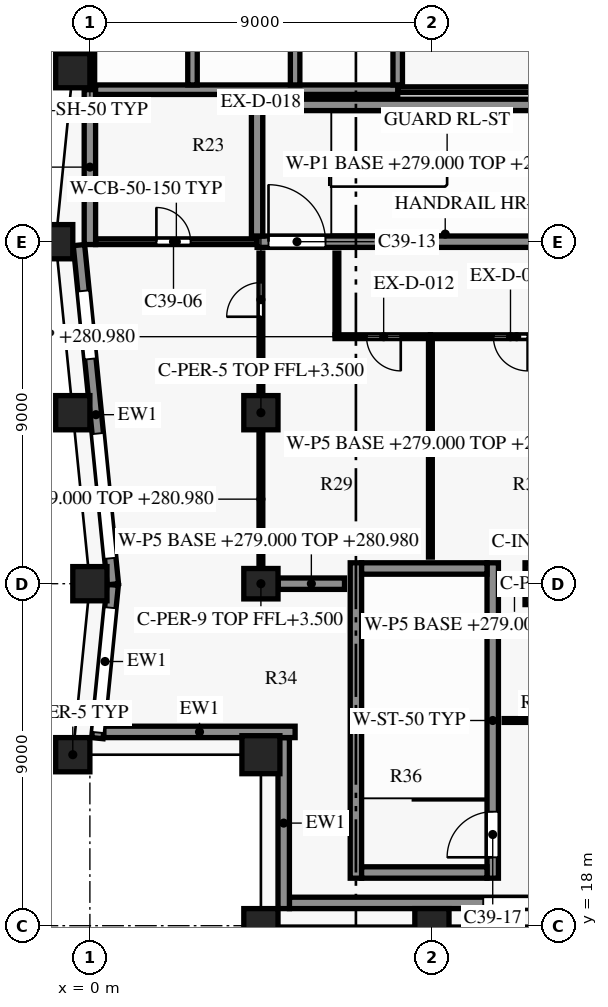
"""IFC4 building model, lengths in metres.
Left out: names, types, materials, properties, quantities, classifications, styles, units other than length and angle.
Written with IfcOpenShell. Run it as: python <this file> out.ifc"""

import sys

from ifc_helpers import new_model, si_unit, direction, frame, frame_2d, origin, origin_2d, place, context, subcontext, project, spatial, rectangle, extrude, element, fill, save


model = new_model("IFC4")
c1 = context("Model", 3, precision=1e-05, world=origin(), true_north=direction((0.0, 1.0)))
c2 = subcontext(c1, "Body", "Model", "MODEL_VIEW")
j1 = project(units=[si_unit("LENGTHUNIT", "METRE"), si_unit("PLANEANGLEUNIT", "RADIAN")], contexts=[c1])
p1 = place(None, origin())
s1 = spatial("IfcSite", under=j1, at=p1, CompositionType="ELEMENT")
p2 = place(p1, origin())
s2 = spatial("IfcBuilding", under=s1, at=p2, CompositionType="ELEMENT")
p3 = place(p2, frame((0.0, 0.0, 279.0)))
s3 = spatial("IfcBuildingStorey", under=s2, at=p3, CompositionType="ELEMENT", Elevation=279.0)
for number, where, z_axis, x_axis in (
    (1, (4.5, 18.0, 0.0), (0.0, 0.0, 1.0), (1.0, 0.0, 0.0)),
    (2, (9.0, 18.0, 0.0), (0.0, 0.0, 1.0), (1.0, 0.0, 0.0)),
    (3, (-0.45, 40.5, 0.0), (0.0, 0.0, 1.0), (-0.1, -0.995, 0.0)),
    (4, (-0.9, 36.0, 0.0), (0.0, 0.0, 1.0), (0.0, -1.0, 0.0)),
    (5, (-0.45, 31.5, 0.0), (0.0, 0.0, 1.0), (0.1, -0.995, 0.0)),
    (6, (0.0, 27.0, 0.0), (0.0, 0.0, 1.0), (0.0, -1.0, 0.0)),
    (7, (-0.45, 22.5, 0.0), (0.0, 0.0, 1.0), (-0.1, -0.995, 0.0)),
):
    element("IfcColumn", number, at=place(p3, frame(where, z_axis=z_axis, x_axis=x_axis)), inside=s3, PredefinedType="COLUMN", context=c2, shape_type="SweptSolid", body=[
        extrude(rectangle(XDim=0.9, YDim=0.9, at=origin_2d()), origin(), (0.0, 0.0, 1.0), 3.8),
    ])
p4 = place(p3, frame((4.5, 22.5, 0.0), z_axis=(0.0, 0.0, 1.0), x_axis=(1.0, 0.0, 0.0)))
e8 = element("IfcColumn", 8, at=p4, inside=s3, PredefinedType="COLUMN", context=c2, shape_type="SweptSolid", body=[
    extrude(rectangle(XDim=1.0, YDim=1.0, at=origin_2d()), origin(), (0.0, 0.0, 1.0), 3.8),
])
p5 = place(p3, frame((12.0, 27.0, 0.0), z_axis=(0.0, 0.0, 1.0), x_axis=(1.0, 0.0, 0.0)))
e9 = element("IfcColumn", 9, at=p5, inside=s3, PredefinedType="COLUMN", context=c2, shape_type="SweptSolid", body=[
    extrude(rectangle(XDim=1.1, YDim=1.1, at=origin_2d()), origin(), (0.0, 0.0, 1.0), 3.8),
])
p6 = place(p3, frame((31.05, 18.6, 0.0), z_axis=(0.0, 0.0, 1.0), x_axis=(-1.0, 0.0, 0.0)))
e10 = element("IfcWall", 10, at=p6, inside=s3, PredefinedType="SOLIDWALL", context=c2, shape_type="SweptSolid", body=[
    extrude(rectangle(XDim=25.8, YDim=0.3, at=frame_2d((12.9, 0.0))), origin(), (0.0, 0.0, 1.0), 3.15),
])
p7 = place(p6, frame((0.9, 0.0, 0.75)))
e11 = element("IfcOpeningElement", 11, at=p7, cuts=e10, PredefinedType="OPENING", context=c2, shape_type="SweptSolid", body=[
    extrude(rectangle(XDim=1.8, YDim=1.8, at=frame_2d((0.9, 0.9))), frame((0.0, 0.16, 0.0), z_axis=(0.0, -1.0, 0.0), x_axis=(1.0, 0.0, 0.0)), (0.0, 0.0, 1.0), 0.32),
])
p8 = place(p6, frame((5.4, 0.0, 0.75)))
e12 = element("IfcOpeningElement", 12, at=p8, cuts=e10, PredefinedType="OPENING", context=c2, shape_type="SweptSolid", body=[
    extrude(rectangle(XDim=1.8, YDim=1.8, at=frame_2d((0.9, 0.9))), frame((0.0, 0.16, 0.0), z_axis=(0.0, -1.0, 0.0), x_axis=(1.0, 0.0, 0.0)), (0.0, 0.0, 1.0), 0.32),
])
p9 = place(p6, frame((9.15, 0.0, 0.15)))
e13 = element("IfcOpeningElement", 13, at=p9, cuts=e10, PredefinedType="OPENING", context=c2, shape_type="SweptSolid", body=[
    extrude(rectangle(XDim=3.3, YDim=2.4, at=frame_2d((1.65, 1.2))), frame((0.0, 0.16, 0.0), z_axis=(0.0, -1.0, 0.0), x_axis=(1.0, 0.0, 0.0)), (0.0, 0.0, 1.0), 0.32),
])
p10 = place(p6, frame((13.65, 0.0, 0.15)))
e14 = element("IfcOpeningElement", 14, at=p10, cuts=e10, PredefinedType="OPENING", context=c2, shape_type="SweptSolid", body=[
    extrude(rectangle(XDim=3.3, YDim=2.4, at=frame_2d((1.65, 1.2))), frame((0.0, 0.16, 0.0), z_axis=(0.0, -1.0, 0.0), x_axis=(1.0, 0.0, 0.0)), (0.0, 0.0, 1.0), 0.32),
])
p11 = place(p6, frame((18.9, 0.0, 0.75)))
e15 = element("IfcOpeningElement", 15, at=p11, cuts=e10, PredefinedType="OPENING", context=c2, shape_type="SweptSolid", body=[
    extrude(rectangle(XDim=1.8, YDim=1.8, at=frame_2d((0.9, 0.9))), frame((0.0, 0.16, 0.0), z_axis=(0.0, -1.0, 0.0), x_axis=(1.0, 0.0, 0.0)), (0.0, 0.0, 1.0), 0.32),
])
p12 = place(p3, frame((0.604, 26.985, 0.0), z_axis=(0.0, 0.0, 1.0), x_axis=(-0.099509108728, 0.995036651225, 0.0)))
e16 = element("IfcWall", 16, at=p12, inside=s3, PredefinedType="SOLIDWALL", context=c2, shape_type="SweptSolid", body=[
    extrude(rectangle(XDim=8.97, YDim=0.3, at=frame_2d((4.485, 0.0))), origin(), (0.0, 0.0, 1.0), 3.15),
])
p13 = place(p12, frame((0.686, 0.0, 0.15)))
e17 = element("IfcOpeningElement", 17, at=p13, cuts=e16, PredefinedType="OPENING", context=c2, shape_type="SweptSolid", body=[
    extrude(rectangle(XDim=3.3, YDim=2.4, at=frame_2d((1.65, 1.2))), frame((0.0, 0.16, 0.0), z_axis=(0.0, -1.0, 0.0), x_axis=(1.0, 0.0, 0.0)), (0.0, 0.0, 1.0), 0.32),
])
p14 = place(p12, frame((5.958, 0.0, 0.75)))
e18 = element("IfcOpeningElement", 18, at=p14, cuts=e16, PredefinedType="OPENING", context=c2, shape_type="SweptSolid", body=[
    extrude(rectangle(XDim=1.8, YDim=1.8, at=frame_2d((0.9, 0.9))), frame((0.0, 0.16, 0.0), z_axis=(0.0, -1.0, 0.0), x_axis=(1.0, 0.0, 0.0)), (0.0, 0.0, 1.0), 0.32),
])
p15 = place(p3, frame((0.197, 22.935, 0.0), z_axis=(0.0, 0.0, 1.0), x_axis=(0.09951564041, 0.995035997999, 0.0)))
e19 = element("IfcWall", 19, at=p15, inside=s3, PredefinedType="SOLIDWALL", context=c2, shape_type="SweptSolid", body=[
    extrude(rectangle(XDim=4.055, YDim=0.3, at=frame_2d((2.028, 0.0))), origin(), (0.0, 0.0, 1.0), 3.15),
])
p16 = place(p15, frame((0.15, 0.0, 0.15)))
e20 = element("IfcOpeningElement", 20, at=p16, cuts=e19, PredefinedType="OPENING", context=c2, shape_type="SweptSolid", body=[
    extrude(rectangle(XDim=3.3, YDim=2.4, at=frame_2d((1.65, 1.2))), frame((0.0, 0.16, 0.0), z_axis=(0.0, -1.0, 0.0), x_axis=(1.0, 0.0, 0.0)), (0.0, 0.0, 1.0), 0.32),
])
p17 = place(p3, frame((5.4, 23.1, 0.0), z_axis=(0.0, 0.0, 1.0), x_axis=(-1.0, 0.0, 0.0)))
e21 = element("IfcWall", 21, at=p17, inside=s3, PredefinedType="SOLIDWALL", context=c2, shape_type="SweptSolid", body=[
    extrude(rectangle(XDim=5.031, YDim=0.3, at=frame_2d((2.516, 0.0))), origin(), (0.0, 0.0, 1.0), 3.15),
])
p18 = place(p3, frame((5.1, 18.45, 0.0), z_axis=(0.0, 0.0, 1.0), x_axis=(0.0, 1.0, 0.0)))
e22 = element("IfcWall", 22, at=p18, inside=s3, PredefinedType="SOLIDWALL", context=c2, shape_type="SweptSolid", body=[
    extrude(rectangle(XDim=4.5, YDim=0.3, at=frame_2d((2.25, 0.0))), origin(), (0.0, 0.0, 1.0), 3.15),
])
for number, where, z_axis, x_axis in (
    (23, (7.15, 19.4, 0.0), (0.0, 0.0, 1.0), (1.0, 0.0, 0.0)),
    (24, (7.15, 27.4, 0.0), (0.0, 0.0, 1.0), (1.0, 0.0, 0.0)),
):
    element("IfcWall", number, at=place(p3, frame(where, z_axis=z_axis, x_axis=x_axis)), inside=s3, PredefinedType="SHEAR", context=c2, shape_type="SweptSolid", body=[
        extrude(rectangle(XDim=3.3, YDim=0.3, at=frame_2d((1.65, 0.0))), origin(), (0.0, 0.0, 1.0), 3.5),
    ])
p19 = place(p3, frame((0.15, 36.0, 0.0), z_axis=(0.0, 0.0, 1.0), x_axis=(1.0, 0.0, 0.0)))
e25 = element("IfcWall", 25, at=p19, inside=s3, PredefinedType="SHEAR", context=c2, shape_type="SweptSolid", body=[
    extrude(rectangle(XDim=4.25, YDim=0.15, at=frame_2d((2.125, 0.0))), origin(), (0.0, 0.0, 1.0), 3.5),
])
p20 = place(p19, frame((1.6, 0.0, 0.0)))
e26 = element("IfcOpeningElement", 26, at=p20, cuts=e25, PredefinedType="OPENING", context=c2, shape_type="SweptSolid", body=[
    extrude(rectangle(XDim=0.9, YDim=2.1, at=frame_2d((0.45, 1.05))), frame((0.0, 0.085, 0.0), z_axis=(0.0, -1.0, 0.0), x_axis=(1.0, 0.0, 0.0)), (0.0, 0.0, 1.0), 0.17),
])
p21 = place(p3, frame((4.4, 36.0, 0.0), z_axis=(0.0, 0.0, 1.0), x_axis=(1.0, 0.0, 0.0)))
e27 = element("IfcWall", 27, at=p21, inside=s3, PredefinedType="SHEAR", context=c2, shape_type="SweptSolid", body=[
    extrude(rectangle(XDim=8.0, YDim=0.3, at=frame_2d((4.0, 0.0))), origin(), (0.0, 0.0, 1.0), 3.5),
])
p22 = place(p21, frame((0.3, 0.0, 0.0)))
e28 = element("IfcOpeningElement", 28, at=p22, cuts=e27, PredefinedType="OPENING", context=c2, shape_type="SweptSolid", body=[
    extrude(rectangle(XDim=1.5, YDim=2.2, at=frame_2d((0.75, 1.1))), frame((0.0, 0.16, 0.0), z_axis=(0.0, -1.0, 0.0), x_axis=(1.0, 0.0, 0.0)), (0.0, 0.0, 1.0), 0.32),
])
p23 = place(p3, frame((4.55, 39.6, 0.0), z_axis=(0.0, 0.0, 1.0), x_axis=(1.0, 0.0, 0.0)))
e29 = element("IfcWall", 29, at=p23, inside=s3, PredefinedType="SHEAR", context=c2, shape_type="SweptSolid", body=[
    extrude(rectangle(XDim=7.7, YDim=0.3, at=frame_2d((3.85, 0.0))), origin(), (0.0, 0.0, 1.0), 3.5),
])
p24 = place(p3, frame((8.1, 40.0, 0.0), z_axis=(0.0, 0.0, 1.0), x_axis=(1.0, 0.0, 0.0)))
e30 = element("IfcWall", 30, at=p24, inside=s3, PredefinedType="SHEAR", context=c2, shape_type="SweptSolid", body=[
    extrude(rectangle(XDim=16.125, YDim=0.15, at=frame_2d((8.062, 0.0))), origin(), (0.0, 0.0, 1.0), 3.5),
])
p25 = place(p3, frame((0.15, 40.0, 0.0), z_axis=(0.0, 0.0, 1.0), x_axis=(1.0, 0.0, 0.0)))
e31 = element("IfcWall", 31, at=p25, inside=s3, PredefinedType="SHEAR", context=c2, shape_type="SweptSolid", body=[
    extrude(rectangle(XDim=7.95, YDim=0.25, at=frame_2d((3.975, 0.0))), origin(), (0.0, 0.0, 1.0), 3.5),
])
p26 = place(p3, frame((0.0, 35.925, 0.0), z_axis=(0.0, 0.0, 1.0), x_axis=(0.0, 1.0, 0.0)))
e32 = element("IfcWall", 32, at=p26, inside=s3, PredefinedType="SHEAR", context=c2, shape_type="SweptSolid", body=[
    extrude(rectangle(XDim=4.075, YDim=0.3, at=frame_2d((2.038, 0.0))), origin(), (0.0, 0.0, 1.0), 3.5),
])
p27 = place(p3, frame((0.0, 40.0, 0.0), z_axis=(0.0, 0.0, 1.0), x_axis=(0.0, 1.0, 0.0)))
e33 = element("IfcWall", 33, at=p27, inside=s3, PredefinedType="SHEAR", context=c2, shape_type="SweptSolid", body=[
    extrude(rectangle(XDim=3.325, YDim=0.25, at=frame_2d((1.663, 0.0))), origin(), (0.0, 0.0, 1.0), 3.5),
])
p28 = place(p3, frame((2.7, 40.125, 0.0), z_axis=(0.0, 0.0, 1.0), x_axis=(0.0, 1.0, 0.0)))
e34 = element("IfcWall", 34, at=p28, inside=s3, PredefinedType="SHEAR", context=c2, shape_type="SweptSolid", body=[
    extrude(rectangle(XDim=2.95, YDim=0.25, at=frame_2d((1.475, 0.0))), origin(), (0.0, 0.0, 1.0), 3.5),
])
p29 = place(p3, frame((4.4, 39.6, 0.0), z_axis=(0.0, 0.0, 1.0), x_axis=(0.0, 1.0, 0.0)))
e35 = element("IfcWall", 35, at=p29, inside=s3, PredefinedType="SHEAR", context=c2, shape_type="SweptSolid", body=[
    extrude(rectangle(XDim=0.275, YDim=0.15, at=frame_2d((0.137, 0.0))), origin(), (0.0, 0.0, 1.0), 3.5),
])
p30 = place(p3, frame((4.4, 36.15, 0.0), z_axis=(0.0, 0.0, 1.0), x_axis=(0.0, 1.0, 0.0)))
e36 = element("IfcWall", 36, at=p30, inside=s3, PredefinedType="SHEAR", context=c2, shape_type="SweptSolid", body=[
    extrude(rectangle(XDim=3.45, YDim=0.3, at=frame_2d((1.725, 0.0))), origin(), (0.0, 0.0, 1.0), 3.5),
])
p31 = place(p3, frame((5.4, 40.125, 0.0), z_axis=(0.0, 0.0, 1.0), x_axis=(0.0, 1.0, 0.0)))
e37 = element("IfcWall", 37, at=p31, inside=s3, PredefinedType="SHEAR", context=c2, shape_type="SweptSolid", body=[
    extrude(rectangle(XDim=2.95, YDim=0.25, at=frame_2d((1.475, 0.0))), origin(), (0.0, 0.0, 1.0), 3.5),
])
p32 = place(p3, frame((7.0, 19.25, 0.0), z_axis=(0.0, 0.0, 1.0), x_axis=(0.0, 1.0, 0.0)))
e38 = element("IfcWall", 38, at=p32, inside=s3, PredefinedType="SHEAR", context=c2, shape_type="SweptSolid", body=[
    extrude(rectangle(XDim=8.3, YDim=0.3, at=frame_2d((4.15, 0.0))), origin(), (0.0, 0.0, 1.0), 3.5),
])
p33 = place(p3, frame((8.1, 40.125, 0.0), z_axis=(0.0, 0.0, 1.0), x_axis=(0.0, 1.0, 0.0)))
e39 = element("IfcWall", 39, at=p33, inside=s3, PredefinedType="SHEAR", context=c2, shape_type="SweptSolid", body=[
    extrude(rectangle(XDim=2.95, YDim=0.25, at=frame_2d((1.475, 0.0))), origin(), (0.0, 0.0, 1.0), 3.5),
])
p34 = place(p3, frame((10.6, 19.25, 0.0), z_axis=(0.0, 0.0, 1.0), x_axis=(0.0, 1.0, 0.0)))
e40 = element("IfcWall", 40, at=p34, inside=s3, PredefinedType="SHEAR", context=c2, shape_type="SweptSolid", body=[
    extrude(rectangle(XDim=8.3, YDim=0.3, at=frame_2d((4.15, 0.0))), origin(), (0.0, 0.0, 1.0), 3.5),
])
p35 = place(p34, frame((0.55, 0.0, 0.0)))
e41 = element("IfcOpeningElement", 41, at=p35, cuts=e40, PredefinedType="OPENING", context=c2, shape_type="SweptSolid", body=[
    extrude(rectangle(XDim=1.2, YDim=2.2, at=frame_2d((0.6, 1.1))), frame((0.0, 0.16, 0.0), z_axis=(0.0, -1.0, 0.0), x_axis=(1.0, 0.0, 0.0)), (0.0, 0.0, 1.0), 0.32),
])
p36 = place(p3, frame((18.0, 23.4, 0.0), z_axis=(0.0, 0.0, 1.0), x_axis=(-1.0, 0.0, 0.0)))
e42 = element("IfcWall", 42, at=p36, inside=s3, PredefinedType="PARTITIONING", context=c2, shape_type="SweptSolid", body=[
    extrude(rectangle(XDim=7.1, YDim=0.1, at=frame_2d((3.55, 0.0))), origin(), (0.0, 0.0, 1.0), 2.73),
])
p37 = place(p36, frame((2.55, 0.0, 0.0)))
e43 = element("IfcOpeningElement", 43, at=p37, cuts=e42, PredefinedType="OPENING", context=c2, shape_type="SweptSolid", body=[
    extrude(rectangle(XDim=1.8, YDim=2.1, at=frame_2d((0.9, 1.05))), frame((0.0, 0.06, 0.0), z_axis=(0.0, -1.0, 0.0), x_axis=(1.0, 0.0, 0.0)), (0.0, 0.0, 1.0), 0.12),
])
p38 = place(p3, frame((6.7, 27.0, 0.0), z_axis=(0.0, 0.0, 1.0), x_axis=(-1.0, 0.0, 0.0)))
e44 = element("IfcWall", 44, at=p38, inside=s3, PredefinedType="PARTITIONING", context=c2, shape_type="SweptSolid", body=[
    extrude(rectangle(XDim=1.745, YDim=0.3, at=frame_2d((0.873, 0.0))), origin(), (0.0, 0.0, 1.0), 1.98),
])
p39 = place(p3, frame((10.9, 27.0, 0.0), z_axis=(0.0, 0.0, 1.0), x_axis=(1.0, 0.0, 0.0)))
e45 = element("IfcWall", 45, at=p39, inside=s3, PredefinedType="PARTITIONING", context=c2, shape_type="SweptSolid", body=[
    extrude(rectangle(XDim=0.545, YDim=0.3, at=frame_2d((0.272, 0.0))), origin(), (0.0, 0.0, 1.0), 3.33),
])
p40 = place(p3, frame((4.5, 27.405, 0.0), z_axis=(0.0, 0.0, 1.0), x_axis=(0.0, 1.0, 0.0)))
e46 = element("IfcWall", 46, at=p40, inside=s3, PredefinedType="PARTITIONING", context=c2, shape_type="SweptSolid", body=[
    extrude(rectangle(XDim=3.64, YDim=0.1, at=frame_2d((1.82, 0.0))), origin(), (0.0, 0.0, 1.0), 1.98),
])
p41 = place(p3, frame((4.5, 31.955, 0.0), z_axis=(0.0, 0.0, 1.0), x_axis=(0.0, 1.0, 0.0)))
e47 = element("IfcWall", 47, at=p41, inside=s3, PredefinedType="PARTITIONING", context=c2, shape_type="SweptSolid", body=[
    extrude(rectangle(XDim=3.745, YDim=0.1, at=frame_2d((1.873, 0.0))), origin(), (0.0, 0.0, 1.0), 3.33),
])
p42 = place(p41, frame((2.07, 0.0, 0.0)))
e48 = element("IfcOpeningElement", 48, at=p42, cuts=e47, PredefinedType="OPENING", context=c2, shape_type="SweptSolid", body=[
    extrude(rectangle(XDim=0.9, YDim=2.1, at=frame_2d((0.45, 1.05))), frame((0.0, 0.06, 0.0), z_axis=(0.0, -1.0, 0.0), x_axis=(1.0, 0.0, 0.0)), (0.0, 0.0, 1.0), 0.12),
])
p43 = place(p3, frame((8.96, 33.45, 0.0), z_axis=(0.0, 0.0, 1.0), x_axis=(0.0, -1.0, 0.0)))
e49 = element("IfcWall", 49, at=p43, inside=s3, PredefinedType="PARTITIONING", context=c2, shape_type="SweptSolid", body=[
    extrude(rectangle(XDim=5.75, YDim=0.1, at=frame_2d((2.875, 0.0))), origin(), (0.0, 0.0, 1.0), 3.33),
])
p44 = place(p3, frame((8.96, 33.5, 0.0), z_axis=(0.0, 0.0, 1.0), x_axis=(-1.0, 0.0, 0.0)))
e50 = element("IfcWall", 50, at=p44, inside=s3, PredefinedType="PARTITIONING", context=c2, shape_type="SweptSolid", body=[
    extrude(rectangle(XDim=2.51, YDim=0.1, at=frame_2d((1.255, 0.0))), origin(), (0.0, 0.0, 1.0), 3.33),
])
p45 = place(p44, frame((0.78, 0.0, 0.0)))
e51 = element("IfcOpeningElement", 51, at=p45, cuts=e50, PredefinedType="OPENING", context=c2, shape_type="SweptSolid", body=[
    extrude(rectangle(XDim=0.9, YDim=2.1, at=frame_2d((0.45, 1.05))), frame((0.0, 0.06, 0.0), z_axis=(0.0, -1.0, 0.0), x_axis=(1.0, 0.0, 0.0)), (0.0, 0.0, 1.0), 0.12),
])
p46 = place(p3, frame((13.5, 33.5, 0.0), z_axis=(0.0, 0.0, 1.0), x_axis=(-1.0, 0.0, 0.0)))
e52 = element("IfcWall", 52, at=p46, inside=s3, PredefinedType="PARTITIONING", context=c2, shape_type="SweptSolid", body=[
    extrude(rectangle(XDim=4.54, YDim=0.1, at=frame_2d((2.27, 0.0))), origin(), (0.0, 0.0, 1.0), 1.98),
])
p47 = place(p46, frame((1.982, 0.0, 0.0)))
e53 = element("IfcOpeningElement", 53, at=p47, cuts=e52, PredefinedType="OPENING", context=c2, shape_type="SweptSolid", body=[
    extrude(rectangle(XDim=0.9, YDim=2.1, at=frame_2d((0.45, 1.05))), frame((0.0, 0.06, 0.0), z_axis=(0.0, -1.0, 0.0), x_axis=(1.0, 0.0, 0.0)), (0.0, 0.0, 1.0), 0.12),
])
p48 = place(p3, frame((6.5, 33.55, 0.0), z_axis=(0.0, 0.0, 1.0), x_axis=(0.0, 1.0, 0.0)))
e54 = element("IfcWall", 54, at=p48, inside=s3, PredefinedType="PARTITIONING", context=c2, shape_type="SweptSolid", body=[
    extrude(rectangle(XDim=2.15, YDim=0.1, at=frame_2d((1.075, 0.0))), origin(), (0.0, 0.0, 1.0), 3.33),
])
p49 = place(p3, frame((4.5, 27.0, 0.0), z_axis=(0.0, 0.0, 1.0), x_axis=(1.0, 0.0, 0.0)))
e55 = element("IfcColumn", 55, at=p49, inside=s3, PredefinedType="COLUMN", context=c2, shape_type="SweptSolid", body=[
    extrude(rectangle(XDim=0.9, YDim=0.8, at=origin_2d()), origin(), (0.0, 0.0, 1.0), 3.5),
])
p50 = place(p3, frame((4.5, 31.5, 0.0), z_axis=(0.0, 0.0, 1.0), x_axis=(1.0, 0.0, 0.0)))
e56 = element("IfcColumn", 56, at=p50, inside=s3, PredefinedType="COLUMN", context=c2, shape_type="SweptSolid", body=[
    extrude(rectangle(XDim=0.9, YDim=0.9, at=origin_2d()), origin(), (0.0, 0.0, 1.0), 3.5),
])
p51 = place(p11, origin())
e57 = element("IfcWindow", 57, at=p51, inside=s3, PartitioningType="SINGLE_PANEL", PredefinedType="WINDOW", context=c2, shape_type="SweptSolid", body=[
    extrude(rectangle(XDim=1.8, YDim=1.8, at=frame_2d((0.9, 0.9))), frame((0.0, 0.03, 0.0), z_axis=(0.0, -1.0, 0.0), x_axis=(1.0, 0.0, 0.0)), (0.0, 0.0, 1.0), 0.06),
])
fill(e15, e57)
p52 = place(p13, origin())
e58 = element("IfcWindow", 58, at=p52, inside=s3, PartitioningType="SINGLE_PANEL", PredefinedType="WINDOW", context=c2, shape_type="SweptSolid", body=[
    extrude(rectangle(XDim=3.3, YDim=2.4, at=frame_2d((1.65, 1.2))), frame((0.0, 0.03, 0.0), z_axis=(0.0, -1.0, 0.0), x_axis=(1.0, 0.0, 0.0)), (0.0, 0.0, 1.0), 0.06),
])
fill(e17, e58)
p53 = place(p14, origin())
e59 = element("IfcWindow", 59, at=p53, inside=s3, PartitioningType="SINGLE_PANEL", PredefinedType="WINDOW", context=c2, shape_type="SweptSolid", body=[
    extrude(rectangle(XDim=1.8, YDim=1.8, at=frame_2d((0.9, 0.9))), frame((0.0, 0.03, 0.0), z_axis=(0.0, -1.0, 0.0), x_axis=(1.0, 0.0, 0.0)), (0.0, 0.0, 1.0), 0.06),
])
fill(e18, e59)
p54 = place(p16, origin())
e60 = element("IfcWindow", 60, at=p54, inside=s3, PartitioningType="SINGLE_PANEL", PredefinedType="WINDOW", context=c2, shape_type="SweptSolid", body=[
    extrude(rectangle(XDim=3.3, YDim=2.4, at=frame_2d((1.65, 1.2))), frame((0.0, 0.03, 0.0), z_axis=(0.0, -1.0, 0.0), x_axis=(1.0, 0.0, 0.0)), (0.0, 0.0, 1.0), 0.06),
])
fill(e20, e60)
p55 = place(p20, origin())
e61 = element("IfcDoor", 61, at=p55, inside=s3, OperationType="SINGLE_SWING_LEFT", PredefinedType="DOOR", context=c2, shape_type="SweptSolid", body=[
    extrude(rectangle(XDim=0.9, YDim=2.1, at=frame_2d((0.45, 1.05))), frame((0.0, 0.025, 0.0), z_axis=(0.0, -1.0, 0.0), x_axis=(1.0, 0.0, 0.0)), (0.0, 0.0, 1.0), 0.05),
])
fill(e26, e61)
p56 = place(p22, origin())
e62 = element("IfcDoor", 62, at=p56, inside=s3, OperationType="SINGLE_SWING_RIGHT", PredefinedType="DOOR", context=c2, shape_type="SweptSolid", body=[
    extrude(rectangle(XDim=1.5, YDim=2.2, at=frame_2d((0.75, 1.1))), frame((0.0, 0.025, 0.0), z_axis=(0.0, -1.0, 0.0), x_axis=(1.0, 0.0, 0.0)), (0.0, 0.0, 1.0), 0.05),
])
fill(e28, e62)
p57 = place(p35, origin())
e63 = element("IfcDoor", 63, at=p57, inside=s3, OperationType="SINGLE_SWING_RIGHT", PredefinedType="DOOR", context=c2, shape_type="SweptSolid", body=[
    extrude(rectangle(XDim=1.2, YDim=2.2, at=frame_2d((0.6, 1.1))), frame((0.0, 0.025, 0.0), z_axis=(0.0, -1.0, 0.0), x_axis=(1.0, 0.0, 0.0)), (0.0, 0.0, 1.0), 0.05),
])
fill(e41, e63)
p58 = place(p45, origin())
e64 = element("IfcDoor", 64, at=p58, inside=s3, OperationType="SINGLE_SWING_LEFT", PredefinedType="DOOR", context=c2, shape_type="SweptSolid", body=[
    extrude(rectangle(XDim=0.9, YDim=2.1, at=frame_2d((0.45, 1.05))), frame((0.0, 0.025, 0.0), z_axis=(0.0, -1.0, 0.0), x_axis=(1.0, 0.0, 0.0)), (0.0, 0.0, 1.0), 0.05),
])
fill(e51, e64)
p59 = place(p47, origin())
e65 = element("IfcDoor", 65, at=p59, inside=s3, OperationType="SINGLE_SWING_LEFT", PredefinedType="DOOR", context=c2, shape_type="SweptSolid", body=[
    extrude(rectangle(XDim=0.9, YDim=2.1, at=frame_2d((0.45, 1.05))), frame((0.0, 0.025, 0.0), z_axis=(0.0, -1.0, 0.0), x_axis=(1.0, 0.0, 0.0)), (0.0, 0.0, 1.0), 0.05),
])
fill(e53, e65)
p60 = place(p42, origin())
e66 = element("IfcDoor", 66, at=p60, inside=s3, OperationType="SINGLE_SWING_RIGHT", PredefinedType="DOOR", context=c2, shape_type="SweptSolid", body=[
    extrude(rectangle(XDim=0.9, YDim=2.1, at=frame_2d((0.45, 1.05))), frame((0.0, 0.025, 0.0), z_axis=(0.0, -1.0, 0.0), x_axis=(1.0, 0.0, 0.0)), (0.0, 0.0, 1.0), 0.05),
])
fill(e48, e66)
save(model, sys.argv[1])
